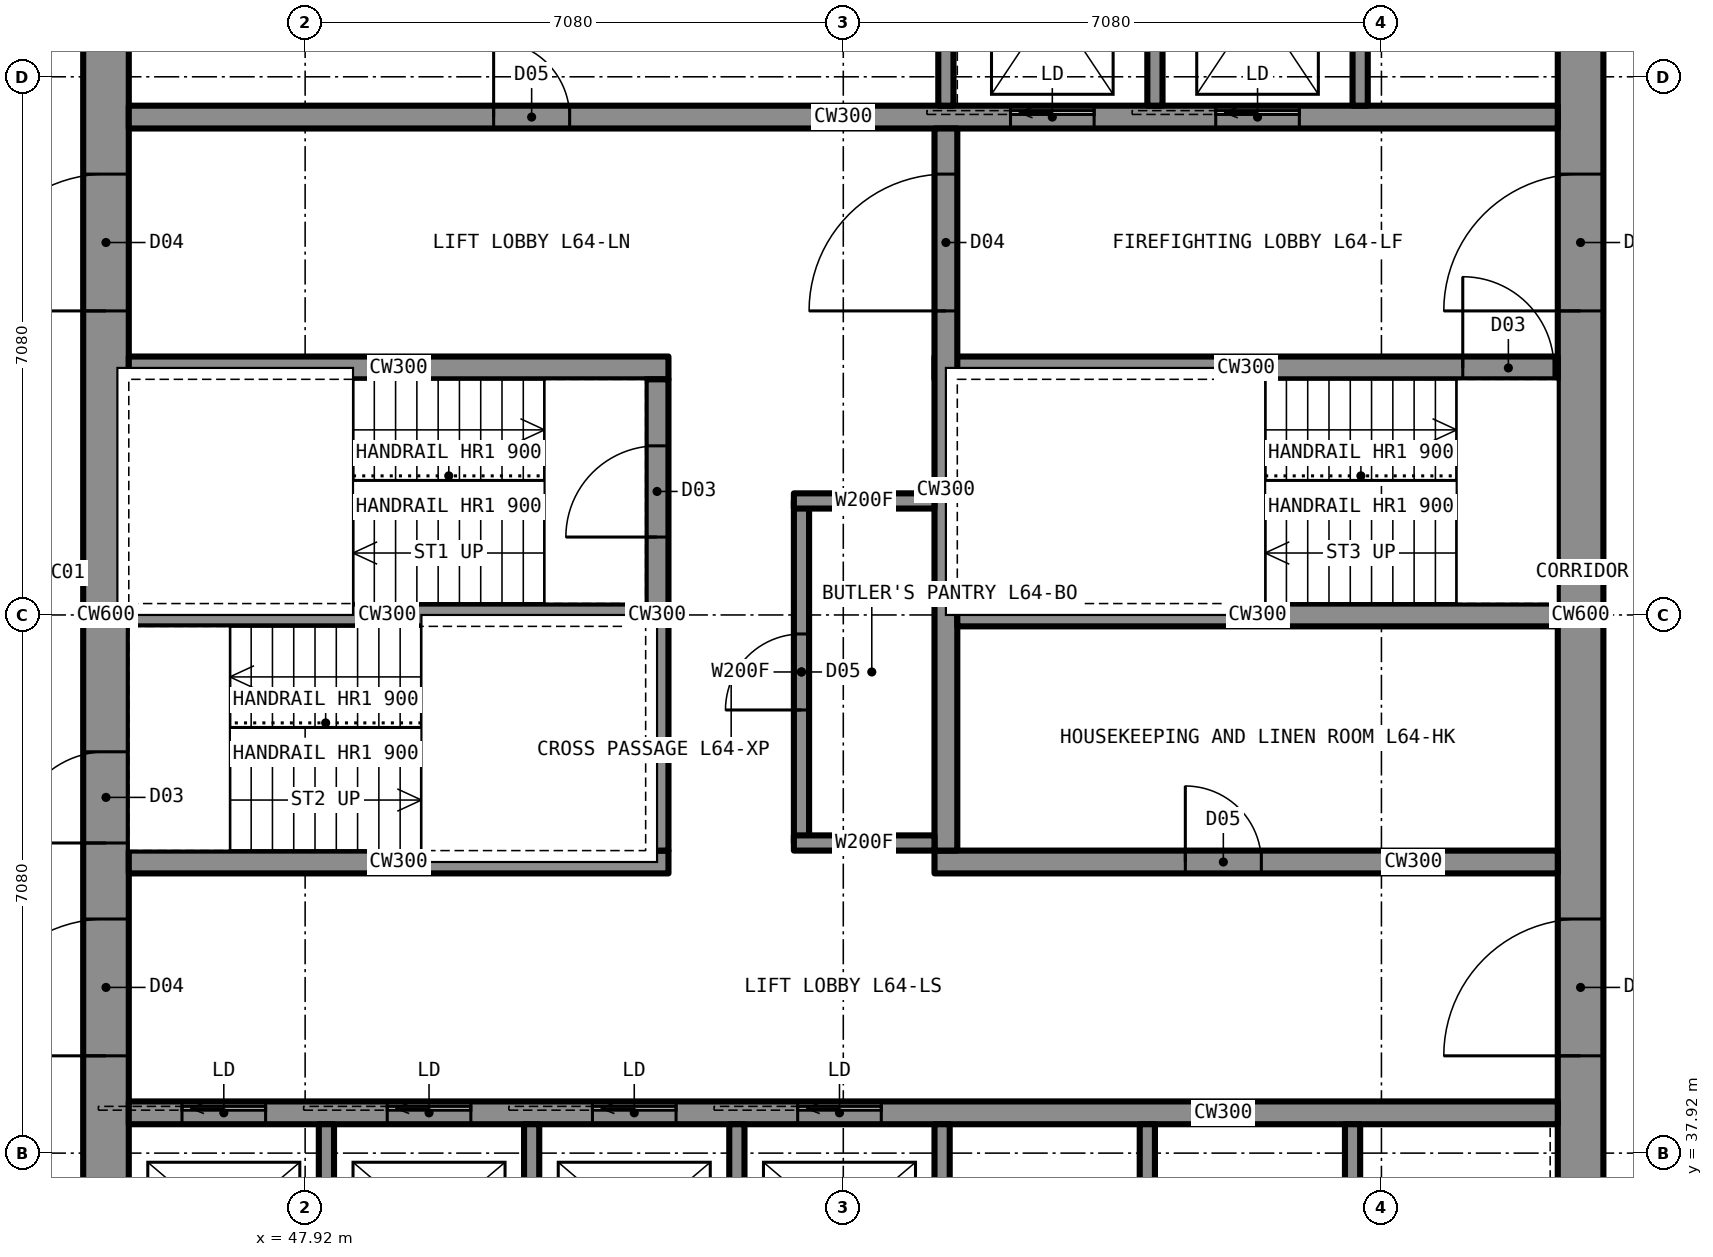
"""IFC4 building model, lengths in metres.
Left out: names, types, materials, properties, quantities, classifications, styles, units other than length and angle.
Written with IfcOpenShell. Run it as: python <this file> out.ifc"""

import sys

from ifc_helpers import new_model, si_unit, direction, frame, frame_2d, origin, place, context, subcontext, project, spatial, rectangle, extrude, element, fill, save


model = new_model("IFC4")
c1 = context("Model", 3, precision=1e-05, world=origin(), true_north=direction((0.0, 1.0)))
c2 = subcontext(c1, "Body", "Model", "MODEL_VIEW")
j1 = project(units=[si_unit("LENGTHUNIT", "METRE"), si_unit("PLANEANGLEUNIT", "RADIAN")], contexts=[c1])
p1 = place(None, origin())
s1 = spatial("IfcSite", under=j1, at=p1, CompositionType="ELEMENT")
p2 = place(p1, origin())
s2 = spatial("IfcBuilding", under=s1, at=p2, CompositionType="ELEMENT")
p3 = place(p2, frame((0.0, 0.0, 237.2)))
s3 = spatial("IfcBuildingStorey", under=s2, at=p3, CompositionType="ELEMENT", Elevation=237.2)
p4 = place(p3, frame((64.7, 35.6, 0.0), z_axis=(0.0, 0.0, 1.0), x_axis=(0.0, 1.0, 0.0)))
e1 = element("IfcWall", 1, at=p4, inside=s3, PredefinedType="SHEAR", context=c2, shape_type="SweptSolid", body=[
    extrude(rectangle(XDim=18.8, YDim=0.6, at=frame_2d((9.4, 0.0))), origin(), (0.0, 0.0, 1.0), 3.5),
])
p5 = place(p4, frame((13.4, 0.0, 0.0)))
e2 = element("IfcOpeningElement", 2, at=p5, cuts=e1, PredefinedType="OPENING", context=c2, shape_type="SweptSolid", body=[
    extrude(rectangle(XDim=1.8, YDim=2.2, at=frame_2d((0.9, 1.1))), frame((0.0, 0.31, 0.0), z_axis=(0.0, -1.0, 0.0), x_axis=(1.0, 0.0, 0.0)), (0.0, 0.0, 1.0), 0.62),
])
p6 = place(p4, frame((3.6, 0.0, 0.0)))
e3 = element("IfcOpeningElement", 3, at=p6, cuts=e1, PredefinedType="OPENING", context=c2, shape_type="SweptSolid", body=[
    extrude(rectangle(XDim=1.8, YDim=2.2, at=frame_2d((0.9, 1.1))), frame((0.0, 0.31, 0.0), z_axis=(0.0, -1.0, 0.0), x_axis=(1.0, 0.0, 0.0)), (0.0, 0.0, 1.0), 0.62),
])
p7 = place(p3, frame((45.3, 35.6, 0.0), z_axis=(0.0, 0.0, 1.0), x_axis=(0.0, 1.0, 0.0)))
e4 = element("IfcWall", 4, at=p7, inside=s3, PredefinedType="SHEAR", context=c2, shape_type="SweptSolid", body=[
    extrude(rectangle(XDim=18.8, YDim=0.6, at=frame_2d((9.4, 0.0))), origin(), (0.0, 0.0, 1.0), 3.5),
])
p8 = place(p7, frame((13.4, 0.0, 0.0)))
e5 = element("IfcOpeningElement", 5, at=p8, cuts=e4, PredefinedType="OPENING", context=c2, shape_type="SweptSolid", body=[
    extrude(rectangle(XDim=1.8, YDim=2.2, at=frame_2d((0.9, 1.1))), frame((0.0, 0.31, 0.0), z_axis=(0.0, -1.0, 0.0), x_axis=(1.0, 0.0, 0.0)), (0.0, 0.0, 1.0), 0.62),
])
p9 = place(p7, frame((3.6, 0.0, 0.0)))
e6 = element("IfcOpeningElement", 6, at=p9, cuts=e4, PredefinedType="OPENING", context=c2, shape_type="SweptSolid", body=[
    extrude(rectangle(XDim=1.8, YDim=2.2, at=frame_2d((0.9, 1.1))), frame((0.0, 0.31, 0.0), z_axis=(0.0, -1.0, 0.0), x_axis=(1.0, 0.0, 0.0)), (0.0, 0.0, 1.0), 0.62),
])
p10 = place(p7, frame((6.4, 0.0, 0.0)))
e7 = element("IfcOpeningElement", 7, at=p10, cuts=e4, PredefinedType="OPENING", context=c2, shape_type="SweptSolid", body=[
    extrude(rectangle(XDim=1.2, YDim=2.2, at=frame_2d((0.6, 1.1))), frame((0.0, 0.31, 0.0), z_axis=(0.0, -1.0, 0.0), x_axis=(1.0, 0.0, 0.0)), (0.0, 0.0, 1.0), 0.62),
])
p11 = place(p3, frame((45.6, 51.55, 0.0), z_axis=(0.0, 0.0, 1.0), x_axis=(1.0, 0.0, 0.0)))
e8 = element("IfcWall", 8, at=p11, inside=s3, PredefinedType="SHEAR", context=c2, shape_type="SweptSolid", body=[
    extrude(rectangle(XDim=18.8, YDim=0.3, at=frame_2d((9.4, 0.0))), origin(), (0.0, 0.0, 1.0), 3.5),
])
p12 = place(p11, frame((4.8, 0.0, 0.0)))
e9 = element("IfcOpeningElement", 9, at=p12, cuts=e8, PredefinedType="OPENING", context=c2, shape_type="SweptSolid", body=[
    extrude(rectangle(XDim=1.0, YDim=2.1, at=frame_2d((0.5, 1.05))), frame((0.0, 0.16, 0.0), z_axis=(0.0, -1.0, 0.0), x_axis=(1.0, 0.0, 0.0)), (0.0, 0.0, 1.0), 0.32),
])
p13 = place(p11, frame((11.6, 0.0, 0.0)))
e10 = element("IfcOpeningElement", 10, at=p13, cuts=e8, PredefinedType="OPENING", context=c2, shape_type="SweptSolid", body=[
    extrude(rectangle(XDim=1.1, YDim=2.2, at=frame_2d((0.55, 1.1))), frame((0.0, 0.16, 0.0), z_axis=(0.0, -1.0, 0.0), x_axis=(1.0, 0.0, 0.0)), (0.0, 0.0, 1.0), 0.32),
])
p14 = place(p11, frame((14.3, 0.0, 0.0)))
e11 = element("IfcOpeningElement", 11, at=p14, cuts=e8, PredefinedType="OPENING", context=c2, shape_type="SweptSolid", body=[
    extrude(rectangle(XDim=1.1, YDim=2.2, at=frame_2d((0.55, 1.1))), frame((0.0, 0.16, 0.0), z_axis=(0.0, -1.0, 0.0), x_axis=(1.0, 0.0, 0.0)), (0.0, 0.0, 1.0), 0.32),
])
p15 = place(p3, frame((45.6, 38.45, 0.0), z_axis=(0.0, 0.0, 1.0), x_axis=(1.0, 0.0, 0.0)))
e12 = element("IfcWall", 12, at=p15, inside=s3, PredefinedType="SHEAR", context=c2, shape_type="SweptSolid", body=[
    extrude(rectangle(XDim=18.8, YDim=0.3, at=frame_2d((9.4, 0.0))), origin(), (0.0, 0.0, 1.0), 3.5),
])
p16 = place(p15, frame((0.7, 0.0, 0.0)))
e13 = element("IfcOpeningElement", 13, at=p16, cuts=e12, PredefinedType="OPENING", context=c2, shape_type="SweptSolid", body=[
    extrude(rectangle(XDim=1.1, YDim=2.2, at=frame_2d((0.55, 1.1))), frame((0.0, 0.16, 0.0), z_axis=(0.0, -1.0, 0.0), x_axis=(1.0, 0.0, 0.0)), (0.0, 0.0, 1.0), 0.32),
])
p17 = place(p15, frame((3.4, 0.0, 0.0)))
e14 = element("IfcOpeningElement", 14, at=p17, cuts=e12, PredefinedType="OPENING", context=c2, shape_type="SweptSolid", body=[
    extrude(rectangle(XDim=1.1, YDim=2.2, at=frame_2d((0.55, 1.1))), frame((0.0, 0.16, 0.0), z_axis=(0.0, -1.0, 0.0), x_axis=(1.0, 0.0, 0.0)), (0.0, 0.0, 1.0), 0.32),
])
p18 = place(p15, frame((6.1, 0.0, 0.0)))
e15 = element("IfcOpeningElement", 15, at=p18, cuts=e12, PredefinedType="OPENING", context=c2, shape_type="SweptSolid", body=[
    extrude(rectangle(XDim=1.1, YDim=2.2, at=frame_2d((0.55, 1.1))), frame((0.0, 0.16, 0.0), z_axis=(0.0, -1.0, 0.0), x_axis=(1.0, 0.0, 0.0)), (0.0, 0.0, 1.0), 0.32),
])
p19 = place(p15, frame((8.8, 0.0, 0.0)))
e16 = element("IfcOpeningElement", 16, at=p19, cuts=e12, PredefinedType="OPENING", context=c2, shape_type="SweptSolid", body=[
    extrude(rectangle(XDim=1.1, YDim=2.2, at=frame_2d((0.55, 1.1))), frame((0.0, 0.16, 0.0), z_axis=(0.0, -1.0, 0.0), x_axis=(1.0, 0.0, 0.0)), (0.0, 0.0, 1.0), 0.32),
])
p20 = place(p3, frame((45.6, 48.25, 0.0), z_axis=(0.0, 0.0, 1.0), x_axis=(1.0, 0.0, 0.0)))
e17 = element("IfcWall", 17, at=p20, inside=s3, PredefinedType="SHEAR", context=c2, shape_type="SweptSolid", body=[
    extrude(rectangle(XDim=7.1, YDim=0.3, at=frame_2d((3.55, 0.0))), origin(), (0.0, 0.0, 1.0), 3.5),
])
p21 = place(p3, frame((56.2, 48.25, 0.0), z_axis=(0.0, 0.0, 1.0), x_axis=(1.0, 0.0, 0.0)))
e18 = element("IfcWall", 18, at=p21, inside=s3, PredefinedType="SHEAR", context=c2, shape_type="SweptSolid", body=[
    extrude(rectangle(XDim=8.2, YDim=0.3, at=frame_2d((4.1, 0.0))), origin(), (0.0, 0.0, 1.0), 3.5),
])
p22 = place(p21, frame((6.95, 0.0, 0.0)))
e19 = element("IfcOpeningElement", 19, at=p22, cuts=e18, PredefinedType="OPENING", context=c2, shape_type="SweptSolid", body=[
    extrude(rectangle(XDim=1.2, YDim=2.2, at=frame_2d((0.6, 1.1))), frame((0.0, 0.16, 0.0), z_axis=(0.0, -1.0, 0.0), x_axis=(1.0, 0.0, 0.0)), (0.0, 0.0, 1.0), 0.32),
])
p23 = place(p3, frame((45.6, 41.75, 0.0), z_axis=(0.0, 0.0, 1.0), x_axis=(1.0, 0.0, 0.0)))
e20 = element("IfcWall", 20, at=p23, inside=s3, PredefinedType="SHEAR", context=c2, shape_type="SweptSolid", body=[
    extrude(rectangle(XDim=7.1, YDim=0.3, at=frame_2d((3.55, 0.0))), origin(), (0.0, 0.0, 1.0), 3.5),
])
p24 = place(p3, frame((56.2, 41.75, 0.0), z_axis=(0.0, 0.0, 1.0), x_axis=(1.0, 0.0, 0.0)))
e21 = element("IfcWall", 21, at=p24, inside=s3, PredefinedType="SHEAR", context=c2, shape_type="SweptSolid", body=[
    extrude(rectangle(XDim=8.2, YDim=0.3, at=frame_2d((4.1, 0.0))), origin(), (0.0, 0.0, 1.0), 3.5),
])
p25 = place(p24, frame((3.3, 0.0, 0.0)))
e22 = element("IfcOpeningElement", 22, at=p25, cuts=e21, PredefinedType="OPENING", context=c2, shape_type="SweptSolid", body=[
    extrude(rectangle(XDim=1.0, YDim=2.1, at=frame_2d((0.5, 1.05))), frame((0.0, 0.16, 0.0), z_axis=(0.0, -1.0, 0.0), x_axis=(1.0, 0.0, 0.0)), (0.0, 0.0, 1.0), 0.32),
])
p26 = place(p3, frame((52.55, 41.9, 0.0), z_axis=(0.0, 0.0, 1.0), x_axis=(0.0, 1.0, 0.0)))
e23 = element("IfcWall", 23, at=p26, inside=s3, PredefinedType="SHEAR", context=c2, shape_type="SweptSolid", body=[
    extrude(rectangle(XDim=6.2, YDim=0.3, at=frame_2d((3.1, 0.0))), origin(), (0.0, 0.0, 1.0), 3.5),
])
p27 = place(p26, frame((4.125, 0.0, 0.0)))
e24 = element("IfcOpeningElement", 24, at=p27, cuts=e23, PredefinedType="OPENING", context=c2, shape_type="SweptSolid", body=[
    extrude(rectangle(XDim=1.2, YDim=2.2, at=frame_2d((0.6, 1.1))), frame((0.0, 0.16, 0.0), z_axis=(0.0, -1.0, 0.0), x_axis=(1.0, 0.0, 0.0)), (0.0, 0.0, 1.0), 0.32),
])
p28 = place(p3, frame((56.35, 41.9, 0.0), z_axis=(0.0, 0.0, 1.0), x_axis=(0.0, 1.0, 0.0)))
e25 = element("IfcWall", 25, at=p28, inside=s3, PredefinedType="SHEAR", context=c2, shape_type="SweptSolid", body=[
    extrude(rectangle(XDim=9.5, YDim=0.3, at=frame_2d((4.75, 0.0))), origin(), (0.0, 0.0, 1.0), 3.5),
])
p29 = place(p28, frame((7.1, 0.0, 0.0)))
e26 = element("IfcOpeningElement", 26, at=p29, cuts=e25, PredefinedType="OPENING", context=c2, shape_type="SweptSolid", body=[
    extrude(rectangle(XDim=1.8, YDim=2.2, at=frame_2d((0.9, 1.1))), frame((0.0, 0.16, 0.0), z_axis=(0.0, -1.0, 0.0), x_axis=(1.0, 0.0, 0.0)), (0.0, 0.0, 1.0), 0.32),
])
p30 = place(p3, frame((45.6, 45.0, 0.0), z_axis=(0.0, 0.0, 1.0), x_axis=(1.0, 0.0, 0.0)))
e27 = element("IfcWall", 27, at=p30, inside=s3, PredefinedType="SHEAR", context=c2, shape_type="SweptSolid", body=[
    extrude(rectangle(XDim=6.8, YDim=0.3, at=frame_2d((3.4, 0.0))), origin(), (0.0, 0.0, 1.0), 3.5),
])
p31 = place(p3, frame((56.5, 45.0, 0.0), z_axis=(0.0, 0.0, 1.0), x_axis=(1.0, 0.0, 0.0)))
e28 = element("IfcWall", 28, at=p31, inside=s3, PredefinedType="SHEAR", context=c2, shape_type="SweptSolid", body=[
    extrude(rectangle(XDim=7.9, YDim=0.3, at=frame_2d((3.95, 0.0))), origin(), (0.0, 0.0, 1.0), 3.5),
])
p32 = place(p3, frame((54.45, 42.0, 0.0), z_axis=(0.0, 0.0, 1.0), x_axis=(0.0, 1.0, 0.0)))
e29 = element("IfcWall", 29, at=p32, inside=s3, PredefinedType="PARTITIONING", context=c2, shape_type="SweptSolid", body=[
    extrude(rectangle(XDim=4.5, YDim=0.2, at=frame_2d((2.25, 0.0))), origin(), (0.0, 0.0, 1.0), 3.33),
])
p33 = place(p32, frame((1.75, 0.0, 0.0)))
e30 = element("IfcOpeningElement", 30, at=p33, cuts=e29, PredefinedType="OPENING", context=c2, shape_type="SweptSolid", body=[
    extrude(rectangle(XDim=1.0, YDim=2.1, at=frame_2d((0.5, 1.05))), frame((0.0, 0.11, 0.0), z_axis=(0.0, -1.0, 0.0), x_axis=(1.0, 0.0, 0.0)), (0.0, 0.0, 1.0), 0.22),
])
for number, where, z_axis, x_axis in (
    (31, (54.35, 42.0, 0.0), (0.0, 0.0, 1.0), (1.0, 0.0, 0.0)),
    (32, (54.35, 46.5, 0.0), (0.0, 0.0, 1.0), (1.0, 0.0, 0.0)),
):
    element("IfcWall", number, at=place(p3, frame(where, z_axis=z_axis, x_axis=x_axis)), inside=s3, PredefinedType="PARTITIONING", context=c2, shape_type="SweptSolid", body=[
        extrude(rectangle(XDim=1.85, YDim=0.2, at=frame_2d((0.925, 0.0))), origin(), (0.0, 0.0, 1.0), 3.33),
    ])
for number, where, z_axis, x_axis in (
    (33, (59.1, 51.7, 0.0), (0.0, 0.0, 1.0), (0.0, 1.0, 0.0)),
    (34, (61.8, 51.7, 0.0), (0.0, 0.0, 1.0), (0.0, 1.0, 0.0)),
    (35, (56.35, 51.7, 0.0), (0.0, 0.0, 1.0), (0.0, 1.0, 0.0)),
    (36, (48.2, 35.6, 0.0), (0.0, 0.0, 1.0), (0.0, 1.0, 0.0)),
    (37, (50.9, 35.6, 0.0), (0.0, 0.0, 1.0), (0.0, 1.0, 0.0)),
    (38, (53.6, 35.6, 0.0), (0.0, 0.0, 1.0), (0.0, 1.0, 0.0)),
    (39, (56.3, 35.6, 0.0), (0.0, 0.0, 1.0), (0.0, 1.0, 0.0)),
    (40, (59.0, 35.6, 0.0), (0.0, 0.0, 1.0), (0.0, 1.0, 0.0)),
    (41, (61.7, 35.6, 0.0), (0.0, 0.0, 1.0), (0.0, 1.0, 0.0)),
):
    element("IfcWall", number, at=place(p3, frame(where, z_axis=z_axis, x_axis=x_axis)), inside=s3, PredefinedType="PARTITIONING", context=c2, shape_type="SweptSolid", body=[
        extrude(rectangle(XDim=2.7, YDim=0.2, at=frame_2d((1.35, 0.0))), origin(), (0.0, 0.0, 1.0), 3.33),
    ])
p34 = place(p33, origin())
e42 = element("IfcDoor", 42, at=p34, inside=s3, OperationType="SINGLE_SWING_LEFT", PredefinedType="DOOR", context=c2, shape_type="SweptSolid", body=[
    extrude(rectangle(XDim=1.0, YDim=2.1, at=frame_2d((0.5, 1.05))), frame((0.0, 0.025, 0.0), z_axis=(0.0, -1.0, 0.0), x_axis=(1.0, 0.0, 0.0)), (0.0, 0.0, 1.0), 0.05),
])
fill(e30, e42)
p35 = place(p8, origin())
e43 = element("IfcDoor", 43, at=p35, inside=s3, OperationType="DOUBLE_DOOR_SINGLE_SWING", PredefinedType="DOOR", context=c2, shape_type="SweptSolid", body=[
    extrude(rectangle(XDim=1.8, YDim=2.2, at=frame_2d((0.9, 1.1))), frame((0.0, 0.025, 0.0), z_axis=(0.0, -1.0, 0.0), x_axis=(1.0, 0.0, 0.0)), (0.0, 0.0, 1.0), 0.05),
])
fill(e5, e43)
p36 = place(p9, origin())
e44 = element("IfcDoor", 44, at=p36, inside=s3, OperationType="DOUBLE_DOOR_SINGLE_SWING", PredefinedType="DOOR", context=c2, shape_type="SweptSolid", body=[
    extrude(rectangle(XDim=1.8, YDim=2.2, at=frame_2d((0.9, 1.1))), frame((0.0, 0.025, 0.0), z_axis=(0.0, -1.0, 0.0), x_axis=(1.0, 0.0, 0.0)), (0.0, 0.0, 1.0), 0.05),
])
fill(e6, e44)
p37 = place(p5, origin())
e45 = element("IfcDoor", 45, at=p37, inside=s3, OperationType="DOUBLE_DOOR_SINGLE_SWING", PredefinedType="DOOR", context=c2, shape_type="SweptSolid", body=[
    extrude(rectangle(XDim=1.8, YDim=2.2, at=frame_2d((0.9, 1.1))), frame((0.0, 0.025, 0.0), z_axis=(0.0, -1.0, 0.0), x_axis=(1.0, 0.0, 0.0)), (0.0, 0.0, 1.0), 0.05),
])
fill(e2, e45)
p38 = place(p6, origin())
e46 = element("IfcDoor", 46, at=p38, inside=s3, OperationType="DOUBLE_DOOR_SINGLE_SWING", PredefinedType="DOOR", context=c2, shape_type="SweptSolid", body=[
    extrude(rectangle(XDim=1.8, YDim=2.2, at=frame_2d((0.9, 1.1))), frame((0.0, 0.025, 0.0), z_axis=(0.0, -1.0, 0.0), x_axis=(1.0, 0.0, 0.0)), (0.0, 0.0, 1.0), 0.05),
])
fill(e3, e46)
p39 = place(p29, origin())
e47 = element("IfcDoor", 47, at=p39, inside=s3, OperationType="DOUBLE_DOOR_SINGLE_SWING", PredefinedType="DOOR", context=c2, shape_type="SweptSolid", body=[
    extrude(rectangle(XDim=1.8, YDim=2.2, at=frame_2d((0.9, 1.1))), frame((0.0, 0.025, 0.0), z_axis=(0.0, -1.0, 0.0), x_axis=(1.0, 0.0, 0.0)), (0.0, 0.0, 1.0), 0.05),
])
fill(e26, e47)
p40 = place(p27, origin())
e48 = element("IfcDoor", 48, at=p40, inside=s3, OperationType="SINGLE_SWING_LEFT", PredefinedType="DOOR", context=c2, shape_type="SweptSolid", body=[
    extrude(rectangle(XDim=1.2, YDim=2.2, at=frame_2d((0.6, 1.1))), frame((0.0, 0.025, 0.0), z_axis=(0.0, -1.0, 0.0), x_axis=(1.0, 0.0, 0.0)), (0.0, 0.0, 1.0), 0.05),
])
fill(e24, e48)
p41 = place(p10, origin())
e49 = element("IfcDoor", 49, at=p41, inside=s3, OperationType="SINGLE_SWING_LEFT", PredefinedType="DOOR", context=c2, shape_type="SweptSolid", body=[
    extrude(rectangle(XDim=1.2, YDim=2.2, at=frame_2d((0.6, 1.1))), frame((0.0, 0.025, 0.0), z_axis=(0.0, -1.0, 0.0), x_axis=(1.0, 0.0, 0.0)), (0.0, 0.0, 1.0), 0.05),
])
fill(e7, e49)
p42 = place(p22, origin())
e50 = element("IfcDoor", 50, at=p42, inside=s3, OperationType="SINGLE_SWING_LEFT", PredefinedType="DOOR", context=c2, shape_type="SweptSolid", body=[
    extrude(rectangle(XDim=1.2, YDim=2.2, at=frame_2d((0.6, 1.1))), frame((0.0, 0.025, 0.0), z_axis=(0.0, -1.0, 0.0), x_axis=(1.0, 0.0, 0.0)), (0.0, 0.0, 1.0), 0.05),
])
fill(e19, e50)
p43 = place(p25, origin())
e51 = element("IfcDoor", 51, at=p43, inside=s3, OperationType="SINGLE_SWING_LEFT", PredefinedType="DOOR", context=c2, shape_type="SweptSolid", body=[
    extrude(rectangle(XDim=1.0, YDim=2.1, at=frame_2d((0.5, 1.05))), frame((0.0, 0.025, 0.0), z_axis=(0.0, -1.0, 0.0), x_axis=(1.0, 0.0, 0.0)), (0.0, 0.0, 1.0), 0.05),
])
fill(e22, e51)
p44 = place(p12, origin())
e52 = element("IfcDoor", 52, at=p44, inside=s3, OperationType="SINGLE_SWING_LEFT", PredefinedType="DOOR", context=c2, shape_type="SweptSolid", body=[
    extrude(rectangle(XDim=1.0, YDim=2.1, at=frame_2d((0.5, 1.05))), frame((0.0, 0.025, 0.0), z_axis=(0.0, -1.0, 0.0), x_axis=(1.0, 0.0, 0.0)), (0.0, 0.0, 1.0), 0.05),
])
fill(e9, e52)
p45 = place(p13, origin())
e53 = element("IfcDoor", 53, at=p45, inside=s3, OperationType="SLIDING_TO_LEFT", PredefinedType="DOOR", context=c2, shape_type="SweptSolid", body=[
    extrude(rectangle(XDim=1.1, YDim=2.2, at=frame_2d((0.55, 1.1))), frame((0.0, 0.025, 0.0), z_axis=(0.0, -1.0, 0.0), x_axis=(1.0, 0.0, 0.0)), (0.0, 0.0, 1.0), 0.05),
])
fill(e10, e53)
p46 = place(p14, origin())
e54 = element("IfcDoor", 54, at=p46, inside=s3, OperationType="SLIDING_TO_LEFT", PredefinedType="DOOR", context=c2, shape_type="SweptSolid", body=[
    extrude(rectangle(XDim=1.1, YDim=2.2, at=frame_2d((0.55, 1.1))), frame((0.0, 0.025, 0.0), z_axis=(0.0, -1.0, 0.0), x_axis=(1.0, 0.0, 0.0)), (0.0, 0.0, 1.0), 0.05),
])
fill(e11, e54)
p47 = place(p16, origin())
e55 = element("IfcDoor", 55, at=p47, inside=s3, OperationType="SLIDING_TO_LEFT", PredefinedType="DOOR", context=c2, shape_type="SweptSolid", body=[
    extrude(rectangle(XDim=1.1, YDim=2.2, at=frame_2d((0.55, 1.1))), frame((0.0, 0.025, 0.0), z_axis=(0.0, -1.0, 0.0), x_axis=(1.0, 0.0, 0.0)), (0.0, 0.0, 1.0), 0.05),
])
fill(e13, e55)
p48 = place(p17, origin())
e56 = element("IfcDoor", 56, at=p48, inside=s3, OperationType="SLIDING_TO_LEFT", PredefinedType="DOOR", context=c2, shape_type="SweptSolid", body=[
    extrude(rectangle(XDim=1.1, YDim=2.2, at=frame_2d((0.55, 1.1))), frame((0.0, 0.025, 0.0), z_axis=(0.0, -1.0, 0.0), x_axis=(1.0, 0.0, 0.0)), (0.0, 0.0, 1.0), 0.05),
])
fill(e14, e56)
p49 = place(p18, origin())
e57 = element("IfcDoor", 57, at=p49, inside=s3, OperationType="SLIDING_TO_LEFT", PredefinedType="DOOR", context=c2, shape_type="SweptSolid", body=[
    extrude(rectangle(XDim=1.1, YDim=2.2, at=frame_2d((0.55, 1.1))), frame((0.0, 0.025, 0.0), z_axis=(0.0, -1.0, 0.0), x_axis=(1.0, 0.0, 0.0)), (0.0, 0.0, 1.0), 0.05),
])
fill(e15, e57)
p50 = place(p19, origin())
e58 = element("IfcDoor", 58, at=p50, inside=s3, OperationType="SLIDING_TO_LEFT", PredefinedType="DOOR", context=c2, shape_type="SweptSolid", body=[
    extrude(rectangle(XDim=1.1, YDim=2.2, at=frame_2d((0.55, 1.1))), frame((0.0, 0.025, 0.0), z_axis=(0.0, -1.0, 0.0), x_axis=(1.0, 0.0, 0.0)), (0.0, 0.0, 1.0), 0.05),
])
fill(e16, e58)
save(model, sys.argv[1])
